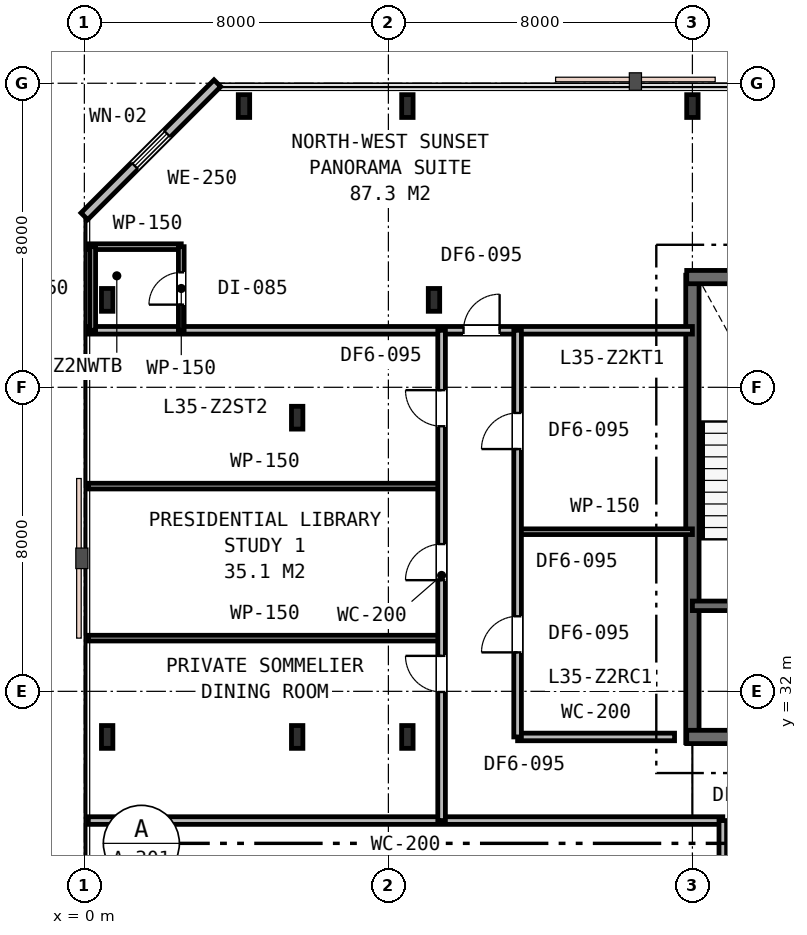
"""IFC4 building model, lengths in metres.
Left out: names, types, materials, properties, quantities, classifications, styles, units other than length and angle.
Written with IfcOpenShell. Run it as: python <this file> out.ifc"""

import sys

from ifc_helpers import new_model, si_unit, direction, frame, frame_2d, origin, origin_2d, place, context, subcontext, project, spatial, rectangle, i_section, extrude, element, fill, save


model = new_model("IFC4")
c1 = context("Model", 3, precision=1e-05, world=origin(), true_north=direction((0.0, 1.0)))
c2 = subcontext(c1, "Body", "Model", "MODEL_VIEW")
j1 = project(units=[si_unit("LENGTHUNIT", "METRE"), si_unit("PLANEANGLEUNIT", "RADIAN")], contexts=[c1])
p1 = place(None, origin())
s1 = spatial("IfcSite", under=j1, at=p1, CompositionType="ELEMENT")
p2 = place(p1, origin())
s2 = spatial("IfcBuilding", under=s1, at=p2, CompositionType="ELEMENT")
p3 = place(p2, frame((0.0, 0.0, 136.8)))
s3 = spatial("IfcBuildingStorey", under=s2, at=p3, CompositionType="ELEMENT", Elevation=136.8)
p4 = place(p3, frame((16.0, 30.65, 0.0), z_axis=(0.0, 0.0, 1.0), x_axis=(0.0, 1.0, 0.0)))
e1 = element("IfcWall", 1, at=p4, inside=s3, PredefinedType="SHEAR", context=c2, shape_type="SweptSolid", body=[
    extrude(rectangle(XDim=12.3, YDim=0.35, at=frame_2d((6.15, 0.0))), origin(), (0.0, 0.0, 1.0), 3.6),
])
p5 = place(p3, frame((15.85, 42.9, 0.0), z_axis=(0.0, 0.0, 1.0), x_axis=(1.0, 0.0, 0.0)))
e2 = element("IfcWall", 2, at=p5, inside=s3, PredefinedType="SHEAR", context=c2, shape_type="SweptSolid", body=[
    extrude(rectangle(XDim=24.3, YDim=0.35, at=frame_2d((12.15, 0.0))), origin(), (0.0, 0.0, 1.0), 3.6),
])
p6 = place(p3, frame((15.85, 30.8, 0.0), z_axis=(0.0, 0.0, 1.0), x_axis=(1.0, 0.0, 0.0)))
e3 = element("IfcWall", 3, at=p6, inside=s3, PredefinedType="SHEAR", context=c2, shape_type="SweptSolid", body=[
    extrude(rectangle(XDim=11.2, YDim=0.35, at=frame_2d((5.6, 0.0))), origin(), (0.0, 0.0, 1.0), 3.6),
])
p7 = place(p6, frame((2.45, 0.0, 0.0)))
e4 = element("IfcOpeningElement", 4, at=p7, cuts=e3, PredefinedType="OPENING", context=c2, shape_type="SweptSolid", body=[
    extrude(rectangle(XDim=1.1, YDim=2.15, at=frame_2d((0.55, 1.075))), frame((0.0, 0.185, 0.0), z_axis=(0.0, -1.0, 0.0), x_axis=(1.0, 0.0, 0.0)), (0.0, 0.0, 1.0), 0.37),
])
p8 = place(p3, frame((16.0, 34.25, 0.0), z_axis=(0.0, 0.0, 1.0), x_axis=(1.0, 0.0, 0.0)))
e5 = element("IfcWall", 5, at=p8, inside=s3, PredefinedType="SHEAR", context=c2, shape_type="SweptSolid", body=[
    extrude(rectangle(XDim=6.05, YDim=0.25, at=frame_2d((3.025, 0.0))), origin(), (0.0, 0.0, 1.0), 3.6),
])
p9 = place(p8, frame((1.25, 0.0, 0.0)))
e6 = element("IfcOpeningElement", 6, at=p9, cuts=e5, PredefinedType="OPENING", context=c2, shape_type="SweptSolid", body=[
    extrude(rectangle(XDim=1.0, YDim=2.15, at=frame_2d((0.5, 1.075))), frame((0.0, 0.135, 0.0), z_axis=(0.0, -1.0, 0.0), x_axis=(1.0, 0.0, 0.0)), (0.0, 0.0, 1.0), 0.27),
])
p10 = place(p8, frame((4.2, 0.0, 0.0)))
e7 = element("IfcOpeningElement", 7, at=p10, cuts=e5, PredefinedType="OPENING", context=c2, shape_type="SweptSolid", body=[
    extrude(rectangle(XDim=1.1, YDim=2.15, at=frame_2d((0.55, 1.075))), frame((0.0, 0.135, 0.0), z_axis=(0.0, -1.0, 0.0), x_axis=(1.0, 0.0, 0.0)), (0.0, 0.0, 1.0), 0.27),
])
for number, where, z_axis, x_axis in (
    (8, (5.6, 30.8, 0.0), (0.0, 0.0, 1.0), (1.0, 0.0, 0.0)),
    (9, (5.6, 39.2, 0.0), (0.0, 0.0, 1.0), (1.0, 0.0, 0.0)),
    (10, (8.5, 30.8, 0.0), (0.0, 0.0, 1.0), (1.0, 0.0, 0.0)),
    (11, (9.2, 42.3, 0.0), (0.0, 0.0, 1.0), (1.0, 0.0, 0.0)),
    (12, (0.6, 30.8, 0.0), (0.0, 0.0, 1.0), (1.0, 0.0, 0.0)),
    (13, (0.6, 42.3, 0.0), (0.0, 0.0, 1.0), (1.0, 0.0, 0.0)),
    (14, (4.2, 47.4, 0.0), (0.0, 0.0, 1.0), (1.0, 0.0, 0.0)),
    (15, (8.5, 47.4, 0.0), (0.0, 0.0, 1.0), (1.0, 0.0, 0.0)),
    (16, (16.0, 47.4, 0.0), (0.0, 0.0, 1.0), (1.0, 0.0, 0.0)),
):
    element("IfcColumn", number, at=place(p3, frame(where, z_axis=z_axis, x_axis=x_axis)), inside=s3, PredefinedType="COLUMN", context=c2, shape_type="SweptSolid", body=[
        extrude(i_section(OverallWidth=0.3, OverallDepth=0.6, WebThickness=0.015, FlangeThickness=0.03, FilletRadius=0.027, at=origin_2d()), origin(), (0.0, 0.0, 1.0), 3.6),
    ])
p11 = place(p3, frame((3.5, 48.0, 0.0), z_axis=(0.0, 0.0, 1.0), x_axis=(-0.707106781187, -0.707106781187, 0.0)))
e17 = element("IfcWall", 17, at=p11, inside=s3, PredefinedType="STANDARD", context=c2, shape_type="SweptSolid", body=[
    extrude(rectangle(XDim=4.95, YDim=0.25, at=frame_2d((2.475, 0.0))), origin(), (0.0, 0.0, 1.0), 3.33),
])
p12 = place(p11, frame((1.875, 0.0, 0.85)))
e18 = element("IfcOpeningElement", 18, at=p12, cuts=e17, PredefinedType="OPENING", context=c2, shape_type="SweptSolid", body=[
    extrude(rectangle(XDim=1.2, YDim=1.6, at=frame_2d((0.6, 0.8))), frame((0.0, 0.135, 0.0), z_axis=(0.0, -1.0, 0.0), x_axis=(1.0, 0.0, 0.0)), (0.0, 0.0, 1.0), 0.27),
])
p13 = place(p3, frame((0.1, 28.6, 0.0), z_axis=(0.0, 0.0, 1.0), x_axis=(1.0, 0.0, 0.0)))
e19 = element("IfcWall", 19, at=p13, inside=s3, PredefinedType="PARTITIONING", context=c2, shape_type="SweptSolid", body=[
    extrude(rectangle(XDim=16.7, YDim=0.2, at=frame_2d((8.35, 0.0))), origin(), (0.0, 0.0, 1.0), 2.93),
])
p14 = place(p3, frame((11.4, 30.8, 0.0), z_axis=(0.0, 0.0, 1.0), x_axis=(1.0, 0.0, 0.0)))
e20 = element("IfcWall", 20, at=p14, inside=s3, PredefinedType="PARTITIONING", context=c2, shape_type="SweptSolid", body=[
    extrude(rectangle(XDim=4.13, YDim=0.2, at=frame_2d((2.065, 0.0))), origin(), (0.0, 0.0, 1.0), 2.93),
])
p15 = place(p3, frame((16.8, 10.6, 0.0), z_axis=(0.0, 0.0, 1.0), x_axis=(0.0, 1.0, 0.0)))
e21 = element("IfcWall", 21, at=p15, inside=s3, PredefinedType="PARTITIONING", context=c2, shape_type="SweptSolid", body=[
    extrude(rectangle(XDim=18.0, YDim=0.2, at=frame_2d((9.0, 0.0))), origin(), (0.0, 0.0, 1.0), 2.93),
])
p16 = place(p15, frame((8.679, 0.0, 0.0)))
e22 = element("IfcOpeningElement", 22, at=p16, cuts=e21, PredefinedType="OPENING", context=c2, shape_type="SweptSolid", body=[
    extrude(rectangle(XDim=0.95, YDim=2.15, at=frame_2d((0.475, 1.075))), frame((0.0, 0.11, 0.0), z_axis=(0.0, -1.0, 0.0), x_axis=(1.0, 0.0, 0.0)), (0.0, 0.0, 1.0), 0.22),
])
p17 = place(p15, frame((15.399, 0.0, 0.0)))
e23 = element("IfcOpeningElement", 23, at=p17, cuts=e21, PredefinedType="OPENING", context=c2, shape_type="SweptSolid", body=[
    extrude(rectangle(XDim=0.95, YDim=2.15, at=frame_2d((0.475, 1.075))), frame((0.0, 0.11, 0.0), z_axis=(0.0, -1.0, 0.0), x_axis=(1.0, 0.0, 0.0)), (0.0, 0.0, 1.0), 0.22),
])
p18 = place(p15, frame((4.273, 0.0, 0.0)))
e24 = element("IfcOpeningElement", 24, at=p18, cuts=e21, PredefinedType="OPENING", context=c2, shape_type="SweptSolid", body=[
    extrude(rectangle(XDim=0.95, YDim=2.15, at=frame_2d((0.475, 1.075))), frame((0.0, 0.11, 0.0), z_axis=(0.0, -1.0, 0.0), x_axis=(1.0, 0.0, 0.0)), (0.0, 0.0, 1.0), 0.22),
])
p19 = place(p3, frame((0.1, 41.5, 0.0), z_axis=(0.0, 0.0, 1.0), x_axis=(1.0, 0.0, 0.0)))
e25 = element("IfcWall", 25, at=p19, inside=s3, PredefinedType="PARTITIONING", context=c2, shape_type="SweptSolid", body=[
    extrude(rectangle(XDim=15.9, YDim=0.2, at=frame_2d((7.95, 0.0))), origin(), (0.0, 0.0, 1.0), 2.93),
])
p20 = place(p19, frame((9.877, 0.0, 0.0)))
e26 = element("IfcOpeningElement", 26, at=p20, cuts=e25, PredefinedType="OPENING", context=c2, shape_type="SweptSolid", body=[
    extrude(rectangle(XDim=0.95, YDim=2.15, at=frame_2d((0.475, 1.075))), frame((0.0, 0.11, 0.0), z_axis=(0.0, -1.0, 0.0), x_axis=(1.0, 0.0, 0.0)), (0.0, 0.0, 1.0), 0.22),
])
p21 = place(p3, frame((0.1, 43.7, 0.0), z_axis=(0.0, 0.0, 1.0), x_axis=(1.0, 0.0, 0.0)))
e27 = element("IfcWall", 27, at=p21, inside=s3, PredefinedType="PARTITIONING", context=c2, shape_type="SweptSolid", body=[
    extrude(rectangle(XDim=2.45, YDim=0.15, at=frame_2d((1.225, 0.0))), origin(), (0.0, 0.0, 1.0), 3.33),
])
p22 = place(p3, frame((2.55, 41.5, 0.0), z_axis=(0.0, 0.0, 1.0), x_axis=(0.0, 1.0, 0.0)))
e28 = element("IfcWall", 28, at=p22, inside=s3, PredefinedType="PARTITIONING", context=c2, shape_type="SweptSolid", body=[
    extrude(rectangle(XDim=2.2, YDim=0.15, at=frame_2d((1.1, 0.0))), origin(), (0.0, 0.0, 1.0), 2.93),
])
p23 = place(p22, frame((0.675, 0.0, 0.0)))
e29 = element("IfcOpeningElement", 29, at=p23, cuts=e28, PredefinedType="OPENING", context=c2, shape_type="SweptSolid", body=[
    extrude(rectangle(XDim=0.85, YDim=2.15, at=frame_2d((0.425, 1.075))), frame((0.0, 0.085, 0.0), z_axis=(0.0, -1.0, 0.0), x_axis=(1.0, 0.0, 0.0)), (0.0, 0.0, 1.0), 0.17),
])
p24 = place(p3, frame((0.22, 41.5, 0.0), z_axis=(0.0, 0.0, 1.0), x_axis=(0.0, 1.0, 0.0)))
e30 = element("IfcWall", 30, at=p24, inside=s3, PredefinedType="PARTITIONING", context=c2, shape_type="SweptSolid", body=[
    extrude(rectangle(XDim=2.2, YDim=0.15, at=frame_2d((1.1, 0.0))), origin(), (0.0, 0.0, 1.0), 2.93),
])
for number, where, z_axis, x_axis in (
    (31, (0.1, 33.4, 0.0), (0.0, 0.0, 1.0), (1.0, 0.0, 0.0)),
    (32, (0.1, 37.4, 0.0), (0.0, 0.0, 1.0), (1.0, 0.0, 0.0)),
):
    element("IfcWall", number, at=place(p3, frame(where, z_axis=z_axis, x_axis=x_axis)), inside=s3, PredefinedType="PARTITIONING", context=c2, shape_type="SweptSolid", body=[
        extrude(rectangle(XDim=9.3, YDim=0.15, at=frame_2d((4.65, 0.0))), origin(), (0.0, 0.0, 1.0), 2.93),
    ])
p25 = place(p3, frame((11.4, 36.2, 0.0), z_axis=(0.0, 0.0, 1.0), x_axis=(1.0, 0.0, 0.0)))
e33 = element("IfcWall", 33, at=p25, inside=s3, PredefinedType="PARTITIONING", context=c2, shape_type="SweptSolid", body=[
    extrude(rectangle(XDim=4.6, YDim=0.15, at=frame_2d((2.3, 0.0))), origin(), (0.0, 0.0, 1.0), 3.33),
])
p26 = place(p3, frame((9.4, 28.6, 0.0), z_axis=(0.0, 0.0, 1.0), x_axis=(0.0, 1.0, 0.0)))
e34 = element("IfcWall", 34, at=p26, inside=s3, PredefinedType="PARTITIONING", context=c2, shape_type="SweptSolid", body=[
    extrude(rectangle(XDim=12.9, YDim=0.2, at=frame_2d((6.45, 0.0))), origin(), (0.0, 0.0, 1.0), 2.93),
])
p27 = place(p26, frame((3.383, 0.0, 0.0)))
e35 = element("IfcOpeningElement", 35, at=p27, cuts=e34, PredefinedType="OPENING", context=c2, shape_type="SweptSolid", body=[
    extrude(rectangle(XDim=0.95, YDim=2.15, at=frame_2d((0.475, 1.075))), frame((0.0, 0.11, 0.0), z_axis=(0.0, -1.0, 0.0), x_axis=(1.0, 0.0, 0.0)), (0.0, 0.0, 1.0), 0.22),
])
p28 = place(p26, frame((6.325, 0.0, 0.0)))
e36 = element("IfcOpeningElement", 36, at=p28, cuts=e34, PredefinedType="OPENING", context=c2, shape_type="SweptSolid", body=[
    extrude(rectangle(XDim=0.95, YDim=2.15, at=frame_2d((0.475, 1.075))), frame((0.0, 0.11, 0.0), z_axis=(0.0, -1.0, 0.0), x_axis=(1.0, 0.0, 0.0)), (0.0, 0.0, 1.0), 0.22),
])
p29 = place(p26, frame((10.375, 0.0, 0.0)))
e37 = element("IfcOpeningElement", 37, at=p29, cuts=e34, PredefinedType="OPENING", context=c2, shape_type="SweptSolid", body=[
    extrude(rectangle(XDim=0.95, YDim=2.15, at=frame_2d((0.475, 1.075))), frame((0.0, 0.11, 0.0), z_axis=(0.0, -1.0, 0.0), x_axis=(1.0, 0.0, 0.0)), (0.0, 0.0, 1.0), 0.22),
])
p30 = place(p3, frame((11.4, 30.8, 0.0), z_axis=(0.0, 0.0, 1.0), x_axis=(0.0, 1.0, 0.0)))
e38 = element("IfcWall", 38, at=p30, inside=s3, PredefinedType="PARTITIONING", context=c2, shape_type="SweptSolid", body=[
    extrude(rectangle(XDim=10.7, YDim=0.2, at=frame_2d((5.35, 0.0))), origin(), (0.0, 0.0, 1.0), 2.93),
])
p31 = place(p30, frame((2.225, 0.0, 0.0)))
e39 = element("IfcOpeningElement", 39, at=p31, cuts=e38, PredefinedType="OPENING", context=c2, shape_type="SweptSolid", body=[
    extrude(rectangle(XDim=0.95, YDim=2.15, at=frame_2d((0.475, 1.075))), frame((0.0, 0.11, 0.0), z_axis=(0.0, -1.0, 0.0), x_axis=(1.0, 0.0, 0.0)), (0.0, 0.0, 1.0), 0.22),
])
p32 = place(p30, frame((7.575, 0.0, 0.0)))
e40 = element("IfcOpeningElement", 40, at=p32, cuts=e38, PredefinedType="OPENING", context=c2, shape_type="SweptSolid", body=[
    extrude(rectangle(XDim=0.95, YDim=2.15, at=frame_2d((0.475, 1.075))), frame((0.0, 0.11, 0.0), z_axis=(0.0, -1.0, 0.0), x_axis=(1.0, 0.0, 0.0)), (0.0, 0.0, 1.0), 0.22),
])
p33 = place(p12, origin())
e41 = element("IfcWindow", 41, at=p33, inside=s3, PartitioningType="SINGLE_PANEL", PredefinedType="WINDOW", context=c2, shape_type="SweptSolid", body=[
    extrude(rectangle(XDim=1.2, YDim=1.6, at=frame_2d((0.6, 0.8))), frame((0.0, 0.03, 0.0), z_axis=(0.0, -1.0, 0.0), x_axis=(1.0, 0.0, 0.0)), (0.0, 0.0, 1.0), 0.06),
])
fill(e18, e41)
p34 = place(p20, origin())
e42 = element("IfcDoor", 42, at=p34, inside=s3, OperationType="SINGLE_SWING_RIGHT", PredefinedType="DOOR", context=c2, shape_type="SweptSolid", body=[
    extrude(rectangle(XDim=0.95, YDim=2.15, at=frame_2d((0.475, 1.075))), frame((0.0, 0.025, 0.0), z_axis=(0.0, -1.0, 0.0), x_axis=(1.0, 0.0, 0.0)), (0.0, 0.0, 1.0), 0.05),
])
fill(e26, e42)
p35 = place(p23, origin())
e43 = element("IfcDoor", 43, at=p35, inside=s3, OperationType="SINGLE_SWING_LEFT", PredefinedType="DOOR", context=c2, shape_type="SweptSolid", body=[
    extrude(rectangle(XDim=0.85, YDim=2.15, at=frame_2d((0.425, 1.075))), frame((0.0, 0.025, 0.0), z_axis=(0.0, -1.0, 0.0), x_axis=(1.0, 0.0, 0.0)), (0.0, 0.0, 1.0), 0.05),
])
fill(e29, e43)
p36 = place(p27, origin())
e44 = element("IfcDoor", 44, at=p36, inside=s3, OperationType="SINGLE_SWING_RIGHT", PredefinedType="DOOR", context=c2, shape_type="SweptSolid", body=[
    extrude(rectangle(XDim=0.95, YDim=2.15, at=frame_2d((0.475, 1.075))), frame((0.0, 0.025, 0.0), z_axis=(0.0, -1.0, 0.0), x_axis=(1.0, 0.0, 0.0)), (0.0, 0.0, 1.0), 0.05),
])
fill(e35, e44)
p37 = place(p28, origin())
e45 = element("IfcDoor", 45, at=p37, inside=s3, OperationType="SINGLE_SWING_LEFT", PredefinedType="DOOR", context=c2, shape_type="SweptSolid", body=[
    extrude(rectangle(XDim=0.95, YDim=2.15, at=frame_2d((0.475, 1.075))), frame((0.0, 0.025, 0.0), z_axis=(0.0, -1.0, 0.0), x_axis=(1.0, 0.0, 0.0)), (0.0, 0.0, 1.0), 0.05),
])
fill(e36, e45)
p38 = place(p29, origin())
e46 = element("IfcDoor", 46, at=p38, inside=s3, OperationType="SINGLE_SWING_RIGHT", PredefinedType="DOOR", context=c2, shape_type="SweptSolid", body=[
    extrude(rectangle(XDim=0.95, YDim=2.15, at=frame_2d((0.475, 1.075))), frame((0.0, 0.025, 0.0), z_axis=(0.0, -1.0, 0.0), x_axis=(1.0, 0.0, 0.0)), (0.0, 0.0, 1.0), 0.05),
])
fill(e37, e46)
p39 = place(p31, origin())
e47 = element("IfcDoor", 47, at=p39, inside=s3, OperationType="SINGLE_SWING_LEFT", PredefinedType="DOOR", context=c2, shape_type="SweptSolid", body=[
    extrude(rectangle(XDim=0.95, YDim=2.15, at=frame_2d((0.475, 1.075))), frame((0.0, 0.025, 0.0), z_axis=(0.0, -1.0, 0.0), x_axis=(1.0, 0.0, 0.0)), (0.0, 0.0, 1.0), 0.05),
])
fill(e39, e47)
p40 = place(p32, origin())
e48 = element("IfcDoor", 48, at=p40, inside=s3, OperationType="SINGLE_SWING_LEFT", PredefinedType="DOOR", context=c2, shape_type="SweptSolid", body=[
    extrude(rectangle(XDim=0.95, YDim=2.15, at=frame_2d((0.475, 1.075))), frame((0.0, 0.025, 0.0), z_axis=(0.0, -1.0, 0.0), x_axis=(1.0, 0.0, 0.0)), (0.0, 0.0, 1.0), 0.05),
])
fill(e40, e48)
save(model, sys.argv[1])
